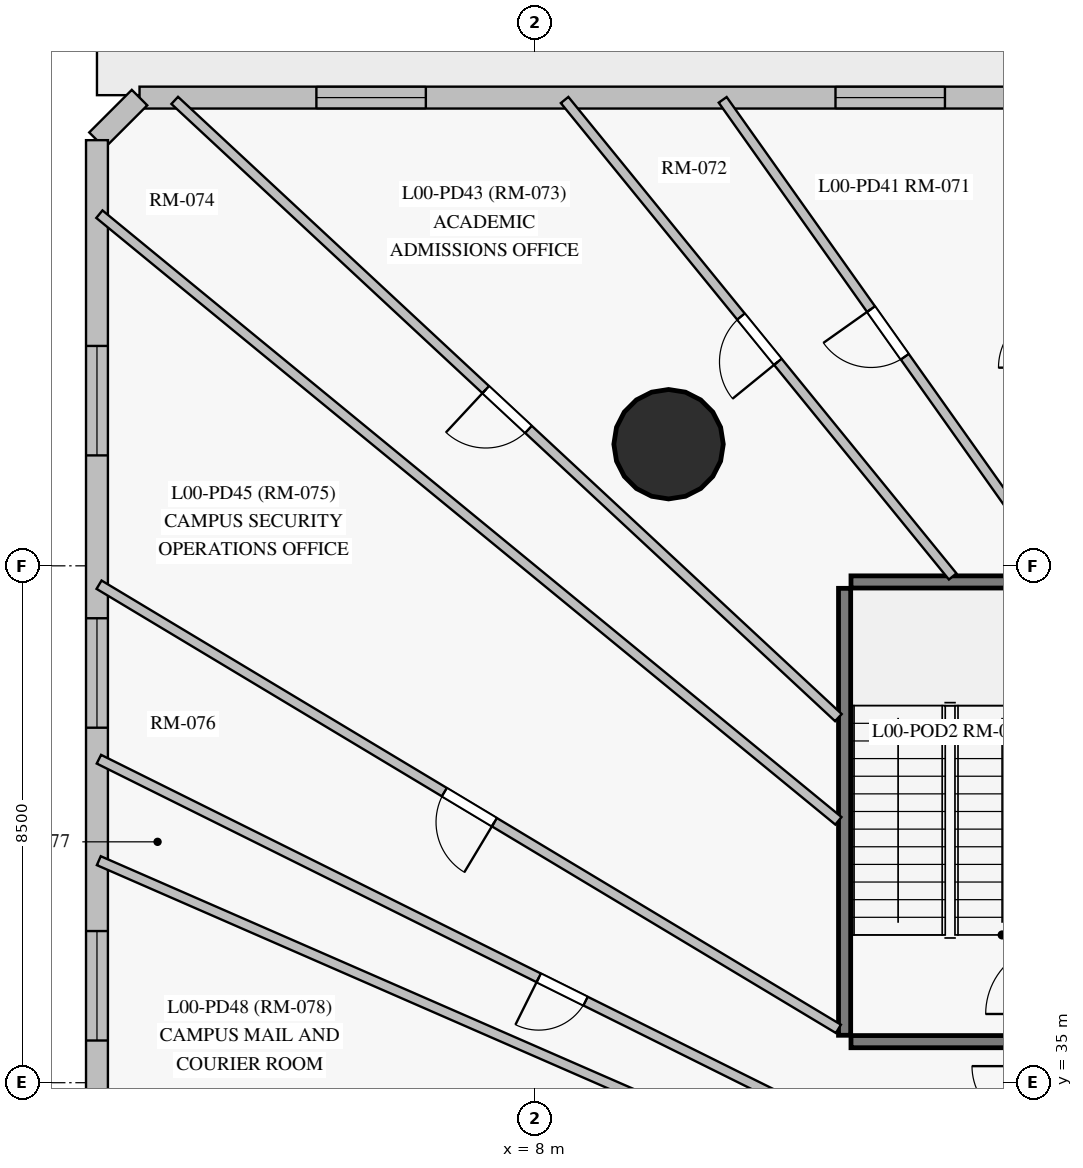
"""IFC4 building model, lengths in metres.
Left out: names, types, materials, properties, quantities, classifications, styles, units other than length and angle.
Written with IfcOpenShell. Run it as: python <this file> out.ifc"""

import sys

from ifc_helpers import new_model, si_unit, direction, frame, frame_2d, origin, origin_with_axes, origin_2d, place, context, subcontext, project, spatial, rectangle, circle, extrude, source, transform, mapped, element, fill, save


model = new_model("IFC4")
c1 = context("Model", 3, precision=1e-05, world=origin(), true_north=direction((0.0, 1.0)))
c2 = subcontext(c1, "Body", "Model", "MODEL_VIEW")
j1 = project(units=[si_unit("LENGTHUNIT", "METRE"), si_unit("PLANEANGLEUNIT", "RADIAN")], contexts=[c1])
p1 = place(None, origin())
s1 = spatial("IfcSite", under=j1, at=p1, CompositionType="ELEMENT")
p2 = place(p1, origin())
s2 = spatial("IfcBuilding", under=s1, at=p2, CompositionType="ELEMENT")
p3 = place(p2, origin())
s3 = spatial("IfcBuildingStorey", under=s2, at=p3, CompositionType="ELEMENT", Elevation=0.0)
m1 = source(origin_with_axes(), c2, "Body", "SweptSolid", [
    extrude(circle(Radius=0.9, at=origin_2d()), origin(), (0.0, 0.0, 1.0), 4.5),
])
p4 = place(p3, frame((10.2, 45.5, 0.0), z_axis=(0.0, 0.0, 1.0), x_axis=(1.0, 0.0, 0.0)))
e1 = element("IfcColumn", 1, at=p4, inside=s3, PredefinedType="COLUMN", context=c2, shape_type="MappedRepresentation", body=[
    mapped(m1, transform((0.0, 0.0, 0.0), scale=1.0)),
])
p5 = place(p3, frame((1.5, 51.2, 0.0), z_axis=(0.0, 0.0, 1.0), x_axis=(1.0, 0.0, 0.0)))
e2 = element("IfcWall", 2, at=p5, inside=s3, PredefinedType="SOLIDWALL", context=c2, shape_type="SweptSolid", body=[
    extrude(rectangle(XDim=54.6, YDim=0.36, at=frame_2d((27.3, 0.0))), origin(), (0.0, 0.0, 1.0), 4.2),
])
p6 = place(p5, frame((51.007, 0.0, 0.85)))
e3 = element("IfcOpeningElement", 3, at=p6, cuts=e2, PredefinedType="OPENING", context=c2, shape_type="SweptSolid", body=[
    extrude(rectangle(XDim=1.8, YDim=2.2, at=frame_2d((0.9, 1.1))), frame((0.0, 0.19, 0.0), z_axis=(0.0, -1.0, 0.0), x_axis=(1.0, 0.0, 0.0)), (0.0, 0.0, 1.0), 0.38),
])
p7 = place(p5, frame((46.765, 0.0, 0.85)))
e4 = element("IfcOpeningElement", 4, at=p7, cuts=e2, PredefinedType="OPENING", context=c2, shape_type="SweptSolid", body=[
    extrude(rectangle(XDim=1.8, YDim=2.2, at=frame_2d((0.9, 1.1))), frame((0.0, 0.19, 0.0), z_axis=(0.0, -1.0, 0.0), x_axis=(1.0, 0.0, 0.0)), (0.0, 0.0, 1.0), 0.38),
])
p8 = place(p5, frame((41.844, 0.0, 0.85)))
e5 = element("IfcOpeningElement", 5, at=p8, cuts=e2, PredefinedType="OPENING", context=c2, shape_type="SweptSolid", body=[
    extrude(rectangle(XDim=1.8, YDim=2.2, at=frame_2d((0.9, 1.1))), frame((0.0, 0.19, 0.0), z_axis=(0.0, -1.0, 0.0), x_axis=(1.0, 0.0, 0.0)), (0.0, 0.0, 1.0), 0.38),
])
p9 = place(p5, frame((36.894, 0.0, 0.85)))
e6 = element("IfcOpeningElement", 6, at=p9, cuts=e2, PredefinedType="OPENING", context=c2, shape_type="SweptSolid", body=[
    extrude(rectangle(XDim=1.8, YDim=2.2, at=frame_2d((0.9, 1.1))), frame((0.0, 0.19, 0.0), z_axis=(0.0, -1.0, 0.0), x_axis=(1.0, 0.0, 0.0)), (0.0, 0.0, 1.0), 0.38),
])
p10 = place(p5, frame((29.542, 0.0, 0.85)))
e7 = element("IfcOpeningElement", 7, at=p10, cuts=e2, PredefinedType="OPENING", context=c2, shape_type="SweptSolid", body=[
    extrude(rectangle(XDim=1.8, YDim=2.2, at=frame_2d((0.9, 1.1))), frame((0.0, 0.19, 0.0), z_axis=(0.0, -1.0, 0.0), x_axis=(1.0, 0.0, 0.0)), (0.0, 0.0, 1.0), 0.38),
])
p11 = place(p5, frame((25.094, 0.0, 0.85)))
e8 = element("IfcOpeningElement", 8, at=p11, cuts=e2, PredefinedType="OPENING", context=c2, shape_type="SweptSolid", body=[
    extrude(rectangle(XDim=1.8, YDim=2.2, at=frame_2d((0.9, 1.1))), frame((0.0, 0.19, 0.0), z_axis=(0.0, -1.0, 0.0), x_axis=(1.0, 0.0, 0.0)), (0.0, 0.0, 1.0), 0.38),
])
p12 = place(p5, frame((11.445, 0.0, 0.85)))
e9 = element("IfcOpeningElement", 9, at=p12, cuts=e2, PredefinedType="OPENING", context=c2, shape_type="SweptSolid", body=[
    extrude(rectangle(XDim=1.8, YDim=2.2, at=frame_2d((0.9, 1.1))), frame((0.0, 0.19, 0.0), z_axis=(0.0, -1.0, 0.0), x_axis=(1.0, 0.0, 0.0)), (0.0, 0.0, 1.0), 0.38),
])
p13 = place(p5, frame((2.908, 0.0, 0.85)))
e10 = element("IfcOpeningElement", 10, at=p13, cuts=e2, PredefinedType="OPENING", context=c2, shape_type="SweptSolid", body=[
    extrude(rectangle(XDim=1.8, YDim=2.2, at=frame_2d((0.9, 1.1))), frame((0.0, 0.19, 0.0), z_axis=(0.0, -1.0, 0.0), x_axis=(1.0, 0.0, 0.0)), (0.0, 0.0, 1.0), 0.38),
])
p14 = place(p5, frame((19.6, 0.0, 0.0)))
e11 = element("IfcOpeningElement", 11, at=p14, cuts=e2, PredefinedType="OPENING", context=c2, shape_type="SweptSolid", body=[
    extrude(rectangle(XDim=1.8, YDim=2.3, at=frame_2d((0.9, 1.15))), frame((0.0, 0.19, 0.0), z_axis=(0.0, -1.0, 0.0), x_axis=(1.0, 0.0, 0.0)), (0.0, 0.0, 1.0), 0.38),
])
p15 = place(p5, frame((22.2, 0.0, 0.0)))
e12 = element("IfcOpeningElement", 12, at=p15, cuts=e2, PredefinedType="OPENING", context=c2, shape_type="SweptSolid", body=[
    extrude(rectangle(XDim=1.8, YDim=2.3, at=frame_2d((0.9, 1.15))), frame((0.0, 0.19, 0.0), z_axis=(0.0, -1.0, 0.0), x_axis=(1.0, 0.0, 0.0)), (0.0, 0.0, 1.0), 0.38),
])
p16 = place(p5, frame((15.5, 0.0, 0.0)))
e13 = element("IfcOpeningElement", 13, at=p16, cuts=e2, PredefinedType="OPENING", context=c2, shape_type="SweptSolid", body=[
    extrude(rectangle(XDim=1.8, YDim=2.3, at=frame_2d((0.9, 1.15))), frame((0.0, 0.19, 0.0), z_axis=(0.0, -1.0, 0.0), x_axis=(1.0, 0.0, 0.0)), (0.0, 0.0, 1.0), 0.38),
])
p17 = place(p3, frame((1.5, 51.2, 0.0), z_axis=(0.0, 0.0, 1.0), x_axis=(-0.707106781187, -0.707106781187, 0.0)))
e14 = element("IfcWall", 14, at=p17, inside=s3, PredefinedType="SOLIDWALL", context=c2, shape_type="SweptSolid", body=[
    extrude(rectangle(XDim=0.99, YDim=0.36, at=frame_2d((0.495, 0.0))), origin(), (0.0, 0.0, 1.0), 4.2),
])
p18 = place(p3, frame((0.8, 2.5, 0.0), z_axis=(0.0, 0.0, 1.0), x_axis=(0.0, 1.0, 0.0)))
e15 = element("IfcWall", 15, at=p18, inside=s3, PredefinedType="SOLIDWALL", context=c2, shape_type="SweptSolid", body=[
    extrude(rectangle(XDim=48.0, YDim=0.36, at=frame_2d((24.0, 0.0))), origin(), (0.0, 0.0, 1.0), 4.2),
])
p19 = place(p18, frame((42.816, 0.0, 0.85)))
e16 = element("IfcOpeningElement", 16, at=p19, cuts=e15, PredefinedType="OPENING", context=c2, shape_type="SweptSolid", body=[
    extrude(rectangle(XDim=1.8, YDim=2.2, at=frame_2d((0.9, 1.1))), frame((0.0, 0.19, 0.0), z_axis=(0.0, -1.0, 0.0), x_axis=(1.0, 0.0, 0.0)), (0.0, 0.0, 1.0), 0.38),
])
p20 = place(p18, frame((38.338, 0.0, 0.85)))
e17 = element("IfcOpeningElement", 17, at=p20, cuts=e15, PredefinedType="OPENING", context=c2, shape_type="SweptSolid", body=[
    extrude(rectangle(XDim=1.8, YDim=2.2, at=frame_2d((0.9, 1.1))), frame((0.0, 0.19, 0.0), z_axis=(0.0, -1.0, 0.0), x_axis=(1.0, 0.0, 0.0)), (0.0, 0.0, 1.0), 0.38),
])
p21 = place(p18, frame((33.194, 0.0, 0.85)))
e18 = element("IfcOpeningElement", 18, at=p21, cuts=e15, PredefinedType="OPENING", context=c2, shape_type="SweptSolid", body=[
    extrude(rectangle(XDim=1.8, YDim=2.2, at=frame_2d((0.9, 1.1))), frame((0.0, 0.19, 0.0), z_axis=(0.0, -1.0, 0.0), x_axis=(1.0, 0.0, 0.0)), (0.0, 0.0, 1.0), 0.38),
])
p22 = place(p18, frame((29.492, 0.0, 0.85)))
e19 = element("IfcOpeningElement", 19, at=p22, cuts=e15, PredefinedType="OPENING", context=c2, shape_type="SweptSolid", body=[
    extrude(rectangle(XDim=1.8, YDim=2.2, at=frame_2d((0.9, 1.1))), frame((0.0, 0.19, 0.0), z_axis=(0.0, -1.0, 0.0), x_axis=(1.0, 0.0, 0.0)), (0.0, 0.0, 1.0), 0.38),
])
p23 = place(p18, frame((24.971, 0.0, 0.85)))
e20 = element("IfcOpeningElement", 20, at=p23, cuts=e15, PredefinedType="OPENING", context=c2, shape_type="SweptSolid", body=[
    extrude(rectangle(XDim=1.8, YDim=2.2, at=frame_2d((0.9, 1.1))), frame((0.0, 0.19, 0.0), z_axis=(0.0, -1.0, 0.0), x_axis=(1.0, 0.0, 0.0)), (0.0, 0.0, 1.0), 0.38),
])
p24 = place(p18, frame((12.315, 0.0, 0.85)))
e21 = element("IfcOpeningElement", 21, at=p24, cuts=e15, PredefinedType="OPENING", context=c2, shape_type="SweptSolid", body=[
    extrude(rectangle(XDim=1.8, YDim=2.2, at=frame_2d((0.9, 1.1))), frame((0.0, 0.19, 0.0), z_axis=(0.0, -1.0, 0.0), x_axis=(1.0, 0.0, 0.0)), (0.0, 0.0, 1.0), 0.38),
])
p25 = place(p18, frame((6.841, 0.0, 0.85)))
e22 = element("IfcOpeningElement", 22, at=p25, cuts=e15, PredefinedType="OPENING", context=c2, shape_type="SweptSolid", body=[
    extrude(rectangle(XDim=1.8, YDim=2.2, at=frame_2d((0.9, 1.1))), frame((0.0, 0.19, 0.0), z_axis=(0.0, -1.0, 0.0), x_axis=(1.0, 0.0, 0.0)), (0.0, 0.0, 1.0), 0.38),
])
p26 = place(p18, frame((3.189, 0.0, 0.85)))
e23 = element("IfcOpeningElement", 23, at=p26, cuts=e15, PredefinedType="OPENING", context=c2, shape_type="SweptSolid", body=[
    extrude(rectangle(XDim=1.8, YDim=2.2, at=frame_2d((0.9, 1.1))), frame((0.0, 0.19, 0.0), z_axis=(0.0, -1.0, 0.0), x_axis=(1.0, 0.0, 0.0)), (0.0, 0.0, 1.0), 0.38),
])
p27 = place(p18, frame((17.2, 0.0, 0.0)))
e24 = element("IfcOpeningElement", 24, at=p27, cuts=e15, PredefinedType="OPENING", context=c2, shape_type="SweptSolid", body=[
    extrude(rectangle(XDim=1.8, YDim=2.3, at=frame_2d((0.9, 1.15))), frame((0.0, 0.19, 0.0), z_axis=(0.0, -1.0, 0.0), x_axis=(1.0, 0.0, 0.0)), (0.0, 0.0, 1.0), 0.38),
])
p28 = place(p3, frame((13.095, 35.78, 0.0), z_axis=(0.0, 0.0, 1.0), x_axis=(0.0, 1.0, 0.0)))
e25 = element("IfcWall", 25, at=p28, inside=s3, PredefinedType="SHEAR", context=c2, shape_type="SweptSolid", body=[
    extrude(rectangle(XDim=7.35, YDim=0.2, at=frame_2d((3.675, 0.0))), origin(), (0.0, 0.0, 1.0), 4.2),
])
for number, where, z_axis, x_axis in (
    (26, (13.2, 35.675, 0.0), (0.0, 0.0, 1.0), (1.0, 0.0, 0.0)),
    (27, (13.2, 43.235, 0.0), (0.0, 0.0, 1.0), (1.0, 0.0, 0.0)),
):
    element("IfcWall", number, at=place(p3, frame(where, z_axis=z_axis, x_axis=x_axis)), inside=s3, PredefinedType="SHEAR", context=c2, shape_type="SweptSolid", body=[
        extrude(rectangle(XDim=3.26, YDim=0.2, at=frame_2d((1.63, 0.0))), origin(), (0.0, 0.0, 1.0), 4.2),
    ])
p29 = place(p3, frame((16.068, 32.747, 0.0), z_axis=(0.0, 0.0, 1.0), x_axis=(-0.895480769827, 0.44510020318, 0.0)))
e28 = element("IfcWall", 28, at=p29, inside=s3, PredefinedType="PARTITIONING", context=c2, shape_type="SweptSolid", body=[
    extrude(rectangle(XDim=17.015, YDim=0.16, at=frame_2d((8.507, 0.0))), origin(), (0.0, 0.0, 1.0), 4.2),
])
p30 = place(p29, frame((8.077, 0.0, 0.0)))
e29 = element("IfcOpeningElement", 29, at=p30, cuts=e28, PredefinedType="OPENING", context=c2, shape_type="SweptSolid", body=[
    extrude(rectangle(XDim=0.86, YDim=2.04, at=frame_2d((0.43, 1.02))), frame((0.0, 0.09, 0.0), z_axis=(0.0, -1.0, 0.0), x_axis=(1.0, 0.0, 0.0)), (0.0, 0.0, 1.0), 0.18),
])
p31 = place(p3, frame((16.068, 31.996, 0.0), z_axis=(0.0, 0.0, 1.0), x_axis=(-0.916400464202, 0.400262650281, 0.0)))
e30 = element("IfcWall", 30, at=p31, inside=s3, PredefinedType="PARTITIONING", context=c2, shape_type="SweptSolid", body=[
    extrude(rectangle(XDim=16.628, YDim=0.16, at=frame_2d((8.314, 0.0))), origin(), (0.0, 0.0, 1.0), 4.2),
])
p32 = place(p3, frame((12.993, 39.307, 0.0), z_axis=(0.0, 0.0, 1.0), x_axis=(-0.772944890545, 0.634473164272, 0.0)))
e31 = element("IfcWall", 31, at=p32, inside=s3, PredefinedType="PARTITIONING", context=c2, shape_type="SweptSolid", body=[
    extrude(rectangle(XDim=15.723, YDim=0.16, at=frame_2d((7.862, 0.0))), origin(), (0.0, 0.0, 1.0), 4.2),
])
p33 = place(p3, frame((12.993, 41.004, 0.0), z_axis=(0.0, 0.0, 1.0), x_axis=(-0.732268799171, 0.681015716236, 0.0)))
e32 = element("IfcWall", 32, at=p33, inside=s3, PredefinedType="PARTITIONING", context=c2, shape_type="SweptSolid", body=[
    extrude(rectangle(XDim=14.905, YDim=0.16, at=frame_2d((7.452, 0.0))), origin(), (0.0, 0.0, 1.0), 4.2),
])
p34 = place(p33, frame((6.96, 0.0, 0.0)))
e33 = element("IfcOpeningElement", 33, at=p34, cuts=e32, PredefinedType="OPENING", context=c2, shape_type="SweptSolid", body=[
    extrude(rectangle(XDim=0.96, YDim=2.15, at=frame_2d((0.48, 1.075))), frame((0.0, 0.09, 0.0), z_axis=(0.0, -1.0, 0.0), x_axis=(1.0, 0.0, 0.0)), (0.0, 0.0, 1.0), 0.18),
])
p35 = place(p3, frame((12.993, 35.885, 0.0), z_axis=(0.0, 0.0, 1.0), x_axis=(-0.857213350392, 0.514961427594, 0.0)))
e34 = element("IfcWall", 34, at=p35, inside=s3, PredefinedType="PARTITIONING", context=c2, shape_type="SweptSolid", body=[
    extrude(rectangle(XDim=14.184, YDim=0.16, at=frame_2d((7.092, 0.0))), origin(), (0.0, 0.0, 1.0), 4.2),
])
p36 = place(p35, frame((6.6, 0.0, 0.0)))
e35 = element("IfcOpeningElement", 35, at=p36, cuts=e34, PredefinedType="OPENING", context=c2, shape_type="SweptSolid", body=[
    extrude(rectangle(XDim=0.96, YDim=2.15, at=frame_2d((0.48, 1.075))), frame((0.0, 0.09, 0.0), z_axis=(0.0, -1.0, 0.0), x_axis=(1.0, 0.0, 0.0)), (0.0, 0.0, 1.0), 0.18),
])
p37 = place(p3, frame((14.872, 43.325, 0.0), z_axis=(0.0, 0.0, 1.0), x_axis=(-0.63154172537, 0.775341891759, 0.0)))
e36 = element("IfcWall", 36, at=p37, inside=s3, PredefinedType="PARTITIONING", context=c2, shape_type="SweptSolid", body=[
    extrude(rectangle(XDim=10.105, YDim=0.16, at=frame_2d((5.053, 0.0))), origin(), (0.0, 0.0, 1.0), 4.2),
])
p38 = place(p37, frame((4.552, 0.0, 0.0)))
e37 = element("IfcOpeningElement", 37, at=p38, cuts=e36, PredefinedType="OPENING", context=c2, shape_type="SweptSolid", body=[
    extrude(rectangle(XDim=0.96, YDim=2.15, at=frame_2d((0.48, 1.075))), frame((0.0, 0.09, 0.0), z_axis=(0.0, -1.0, 0.0), x_axis=(1.0, 0.0, 0.0)), (0.0, 0.0, 1.0), 0.18),
])
p39 = place(p3, frame((16.51, 43.518, 0.0), z_axis=(0.0, 0.0, 1.0), x_axis=(-0.578309317505, 0.815817585792, 0.0)))
e38 = element("IfcWall", 38, at=p39, inside=s3, PredefinedType="PARTITIONING", context=c2, shape_type="SweptSolid", body=[
    extrude(rectangle(XDim=9.372, YDim=0.16, at=frame_2d((4.686, 0.0))), origin(), (0.0, 0.0, 1.0), 4.2),
])
p40 = place(p39, frame((4.193, 0.0, 0.0)))
e39 = element("IfcOpeningElement", 39, at=p40, cuts=e38, PredefinedType="OPENING", context=c2, shape_type="SweptSolid", body=[
    extrude(rectangle(XDim=0.96, YDim=2.15, at=frame_2d((0.48, 1.075))), frame((0.0, 0.09, 0.0), z_axis=(0.0, -1.0, 0.0), x_axis=(1.0, 0.0, 0.0)), (0.0, 0.0, 1.0), 0.18),
])
m2 = source(origin_with_axes(), c2, "Body", "SweptSolid", [
    extrude(rectangle(XDim=1.8, YDim=2.2, at=frame_2d((0.9, 1.1))), frame((0.0, 0.03, 0.0), z_axis=(0.0, -1.0, 0.0), x_axis=(1.0, 0.0, 0.0)), (0.0, 0.0, 1.0), 0.06),
])
p41 = place(p12, origin())
e40 = element("IfcWindow", 40, at=p41, inside=s3, PartitioningType="SINGLE_PANEL", PredefinedType="WINDOW", context=c2, shape_type="MappedRepresentation", body=[
    mapped(m2, transform((0.0, 0.0, 0.0), scale=1.0)),
])
fill(e9, e40)
p42 = place(p13, origin())
e41 = element("IfcWindow", 41, at=p42, inside=s3, PartitioningType="SINGLE_PANEL", PredefinedType="WINDOW", context=c2, shape_type="MappedRepresentation", body=[
    mapped(m2, transform((0.0, 0.0, 0.0), scale=1.0)),
])
fill(e10, e41)
p43 = place(p19, origin())
e42 = element("IfcWindow", 42, at=p43, inside=s3, PartitioningType="SINGLE_PANEL", PredefinedType="WINDOW", context=c2, shape_type="MappedRepresentation", body=[
    mapped(m2, transform((0.0, 0.0, 0.0), scale=1.0)),
])
fill(e16, e42)
p44 = place(p20, origin())
e43 = element("IfcWindow", 43, at=p44, inside=s3, PartitioningType="SINGLE_PANEL", PredefinedType="WINDOW", context=c2, shape_type="MappedRepresentation", body=[
    mapped(m2, transform((0.0, 0.0, 0.0), scale=1.0)),
])
fill(e17, e43)
p45 = place(p21, origin())
e44 = element("IfcWindow", 44, at=p45, inside=s3, PartitioningType="SINGLE_PANEL", PredefinedType="WINDOW", context=c2, shape_type="MappedRepresentation", body=[
    mapped(m2, transform((0.0, 0.0, 0.0), scale=1.0)),
])
fill(e18, e44)
m3 = source(origin_with_axes(), c2, "Body", "SweptSolid", [
    extrude(rectangle(XDim=0.96, YDim=2.15, at=frame_2d((0.48, 1.075))), frame((0.0, 0.025, 0.0), z_axis=(0.0, -1.0, 0.0), x_axis=(1.0, 0.0, 0.0)), (0.0, 0.0, 1.0), 0.05),
])
p46 = place(p40, origin())
e45 = element("IfcDoor", 45, at=p46, inside=s3, OperationType="SINGLE_SWING_RIGHT", PredefinedType="DOOR", context=c2, shape_type="MappedRepresentation", body=[
    mapped(m3, transform((0.0, 0.0, 0.0), scale=1.0)),
])
fill(e39, e45)
p47 = place(p38, origin())
e46 = element("IfcDoor", 46, at=p47, inside=s3, OperationType="SINGLE_SWING_LEFT", PredefinedType="DOOR", context=c2, shape_type="MappedRepresentation", body=[
    mapped(m3, transform((0.0, 0.0, 0.0), scale=1.0)),
])
fill(e37, e46)
p48 = place(p34, origin())
e47 = element("IfcDoor", 47, at=p48, inside=s3, OperationType="SINGLE_SWING_RIGHT", PredefinedType="DOOR", context=c2, shape_type="MappedRepresentation", body=[
    mapped(m3, transform((0.0, 0.0, 0.0), scale=1.0)),
])
fill(e33, e47)
p49 = place(p36, origin())
e48 = element("IfcDoor", 48, at=p49, inside=s3, OperationType="SINGLE_SWING_LEFT", PredefinedType="DOOR", context=c2, shape_type="MappedRepresentation", body=[
    mapped(m3, transform((0.0, 0.0, 0.0), scale=1.0)),
])
fill(e35, e48)
m4 = source(origin_with_axes(), c2, "Body", "SweptSolid", [
    extrude(rectangle(XDim=0.86, YDim=2.04, at=frame_2d((0.43, 1.02))), frame((0.0, 0.025, 0.0), z_axis=(0.0, -1.0, 0.0), x_axis=(1.0, 0.0, 0.0)), (0.0, 0.0, 1.0), 0.05),
])
p50 = place(p30, origin())
e49 = element("IfcDoor", 49, at=p50, inside=s3, OperationType="SINGLE_SWING_RIGHT", PredefinedType="DOOR", context=c2, shape_type="MappedRepresentation", body=[
    mapped(m4, transform((0.0, 0.0, 0.0), scale=1.0)),
])
fill(e29, e49)
save(model, sys.argv[1])
